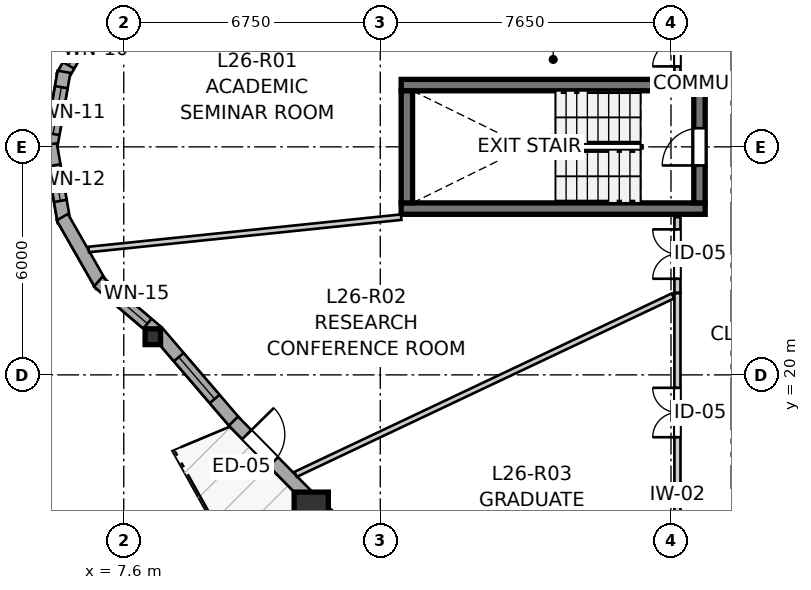
"""IFC4 building model, lengths in metres.
Left out: names, types, materials, properties, quantities, classifications, styles, units other than length and angle.
Written with IfcOpenShell. Run it as: python <this file> out.ifc"""

import sys

from ifc_helpers import new_model, si_unit, direction, frame, frame_2d, origin, origin_2d, place, context, subcontext, project, spatial, rectangle, i_section, extrude, source, transform, mapped, element, fill, save


model = new_model("IFC4")
c1 = context("Model", 3, precision=1e-05, world=origin(), true_north=direction((0.0, 1.0)))
c2 = subcontext(c1, "Body", "Model", "MODEL_VIEW")
j1 = project(units=[si_unit("LENGTHUNIT", "METRE"), si_unit("PLANEANGLEUNIT", "RADIAN")], contexts=[c1])
p1 = place(None, origin())
s1 = spatial("IfcSite", under=j1, at=p1, CompositionType="ELEMENT")
p2 = place(p1, origin())
s2 = spatial("IfcBuilding", under=s1, at=p2, CompositionType="ELEMENT")
p3 = place(p2, frame((0.0, 0.0, 89.6)))
s3 = spatial("IfcBuildingStorey", under=s2, at=p3, CompositionType="ELEMENT", Elevation=89.6)
for number, where, z_axis, x_axis in (
    (1, (14.9, 24.375, 0.0), (0.0, 0.0, 1.0), (1.0, 0.0, 0.0)),
    (2, (22.9, 27.625, 0.0), (0.0, 0.0, 1.0), (-1.0, 0.0, 0.0)),
):
    element("IfcWall", number, at=place(p3, frame(where, z_axis=z_axis, x_axis=x_axis)), inside=s3, PredefinedType="SHEAR", context=c2, shape_type="SweptSolid", body=[
        extrude(rectangle(XDim=8.0, YDim=0.3, at=frame_2d((4.0, 0.0))), origin(), (0.0, 0.0, 1.0), 2.95),
    ])
p4 = place(p3, frame((15.05, 27.475, 0.0), z_axis=(0.0, 0.0, 1.0), x_axis=(0.0, -1.0, 0.0)))
e3 = element("IfcWall", 3, at=p4, inside=s3, PredefinedType="SHEAR", context=c2, shape_type="SweptSolid", body=[
    extrude(rectangle(XDim=2.95, YDim=0.3, at=frame_2d((1.475, 0.0))), origin(), (0.0, 0.0, 1.0), 2.95),
])
p5 = place(p3, frame((22.75, 24.525, 0.0), z_axis=(0.0, 0.0, 1.0), x_axis=(0.0, 1.0, 0.0)))
e4 = element("IfcWall", 4, at=p5, inside=s3, PredefinedType="SHEAR", context=c2, shape_type="SweptSolid", body=[
    extrude(rectangle(XDim=2.95, YDim=0.3, at=frame_2d((1.475, 0.0))), origin(), (0.0, 0.0, 1.0), 2.95),
])
p6 = place(p5, frame((0.985, 0.0, 0.0)))
e5 = element("IfcOpeningElement", 5, at=p6, cuts=e4, PredefinedType="OPENING", context=c2, shape_type="SweptSolid", body=[
    extrude(rectangle(XDim=0.98, YDim=2.15, at=frame_2d((0.49, 1.075))), frame((0.0, 0.16, 0.0), z_axis=(0.0, -1.0, 0.0), x_axis=(1.0, 0.0, 0.0)), (0.0, 0.0, 1.0), 0.32),
])
m1 = source(origin(), c2, "Body", "SweptSolid", [
    extrude(i_section(OverallWidth=0.406, OverallDepth=0.416, WebThickness=0.027, FlangeThickness=0.044, FilletRadius=0.015, at=origin_2d()), origin(), (0.0, 0.0, 1.0), 2.95),
])
p7 = place(p3, frame((8.365, 21.004, 0.0), z_axis=(0.0, 0.0, 1.0), x_axis=(1.0, 0.0, 0.0)))
e6 = element("IfcColumn", 6, at=p7, inside=s3, PredefinedType="PILASTER", context=c2, shape_type="MappedRepresentation", body=[
    mapped(m1, transform((0.0, 0.0, 0.0), x_axis=(1.0, 0.0, 0.0), y_axis=(0.0, 1.0, 0.0), z_axis=(0.0, 0.0, 1.0), scale=1.0)),
])
m2 = source(origin(), c2, "Body", "SweptSolid", [
    extrude(rectangle(XDim=0.9, YDim=0.9, at=origin_2d()), origin(), (0.0, 0.0, 1.0), 2.95),
])
p8 = place(p3, frame((12.534, 16.465, 0.0), z_axis=(0.0, 0.0, 1.0), x_axis=(1.0, 0.0, 0.0)))
e7 = element("IfcColumn", 7, at=p8, inside=s3, PredefinedType="COLUMN", context=c2, shape_type="MappedRepresentation", body=[
    mapped(m2, transform((0.0, 0.0, 0.0), x_axis=(1.0, 0.0, 0.0), y_axis=(0.0, 1.0, 0.0), z_axis=(0.0, 0.0, 1.0), scale=1.0)),
])
p9 = place(p3, frame((7.011, 29.65, 0.0), z_axis=(0.0, 0.0, 1.0), x_axis=(-0.496037473582, -0.868301114132, 0.0)))
e8 = element("IfcWall", 8, at=p9, inside=s3, PredefinedType="SOLIDWALL", context=c2, shape_type="SweptSolid", body=[
    extrude(rectangle(XDim=2.073, YDim=0.34, at=frame_2d((1.037, 0.0))), origin(), (0.0, 0.0, 1.0), 2.48),
])
p10 = place(p9, frame((0.336, 0.0, 0.82)))
e9 = element("IfcOpeningElement", 9, at=p10, cuts=e8, PredefinedType="OPENING", context=c2, shape_type="SweptSolid", body=[
    extrude(rectangle(XDim=1.4, YDim=1.35, at=frame_2d((0.7, 0.675))), frame((0.0, 0.18, 0.0), z_axis=(0.0, -1.0, 0.0), x_axis=(1.0, 0.0, 0.0)), (0.0, 0.0, 1.0), 0.36),
])
p11 = place(p3, frame((6.028, 27.975, 0.0), z_axis=(0.0, 0.0, 1.0), x_axis=(-0.172186061474, -0.985064444711, 0.0)))
e10 = element("IfcWall", 10, at=p11, inside=s3, PredefinedType="SOLIDWALL", context=c2, shape_type="SweptSolid", body=[
    extrude(rectangle(XDim=2.073, YDim=0.34, at=frame_2d((1.037, 0.0))), origin(), (0.0, 0.0, 1.0), 2.48),
])
p12 = place(p11, frame((0.412, 0.0, 0.82)))
e11 = element("IfcOpeningElement", 11, at=p12, cuts=e10, PredefinedType="OPENING", context=c2, shape_type="SweptSolid", body=[
    extrude(rectangle(XDim=1.25, YDim=1.35, at=frame_2d((0.625, 0.675))), frame((0.0, 0.18, 0.0), z_axis=(0.0, -1.0, 0.0), x_axis=(1.0, 0.0, 0.0)), (0.0, 0.0, 1.0), 0.36),
])
p13 = place(p3, frame((5.671, 26.067, 0.0), z_axis=(0.0, 0.0, 1.0), x_axis=(0.172186061474, -0.985064444711, 0.0)))
e12 = element("IfcWall", 12, at=p13, inside=s3, PredefinedType="SOLIDWALL", context=c2, shape_type="SweptSolid", body=[
    extrude(rectangle(XDim=2.073, YDim=0.34, at=frame_2d((1.037, 0.0))), origin(), (0.0, 0.0, 1.0), 2.48),
])
p14 = place(p13, frame((0.562, 0.0, 0.82)))
e13 = element("IfcOpeningElement", 13, at=p14, cuts=e12, PredefinedType="OPENING", context=c2, shape_type="SweptSolid", body=[
    extrude(rectangle(XDim=0.95, YDim=1.35, at=frame_2d((0.475, 0.675))), frame((0.0, 0.18, 0.0), z_axis=(0.0, -1.0, 0.0), x_axis=(1.0, 0.0, 0.0)), (0.0, 0.0, 1.0), 0.36),
])
p15 = place(p3, frame((5.983, 24.15, 0.0), z_axis=(0.0, 0.0, 1.0), x_axis=(0.496037473582, -0.868301114132, 0.0)))
e14 = element("IfcWall", 14, at=p15, inside=s3, PredefinedType="SOLIDWALL", context=c2, shape_type="SweptSolid", body=[
    extrude(rectangle(XDim=2.073, YDim=0.34, at=frame_2d((1.037, 0.0))), origin(), (0.0, 0.0, 1.0), 2.48),
])
p16 = place(p3, frame((6.926, 22.453, 0.0), z_axis=(0.0, 0.0, 1.0), x_axis=(0.76114353683, -0.648583469063, 0.0)))
e15 = element("IfcWall", 15, at=p16, inside=s3, PredefinedType="SOLIDWALL", context=c2, shape_type="SweptSolid", body=[
    extrude(rectangle(XDim=2.015, YDim=0.34, at=frame_2d((1.007, 0.0))), origin(), (0.0, 0.0, 1.0), 2.48),
])
p17 = place(p16, frame((0.252, 0.0, 0.82)))
e16 = element("IfcOpeningElement", 16, at=p17, cuts=e15, PredefinedType="OPENING", context=c2, shape_type="SweptSolid", body=[
    extrude(rectangle(XDim=1.45, YDim=1.25, at=frame_2d((0.725, 0.625))), frame((0.0, 0.18, 0.0), z_axis=(0.0, -1.0, 0.0), x_axis=(1.0, 0.0, 0.0)), (0.0, 0.0, 1.0), 0.36),
])
p18 = place(p3, frame((8.507, 21.099, 0.0), z_axis=(0.0, 0.0, 1.0), x_axis=(0.650714375508, -0.759322593834, 0.0)))
e17 = element("IfcWall", 17, at=p18, inside=s3, PredefinedType="SOLIDWALL", context=c2, shape_type="SweptSolid", body=[
    extrude(rectangle(XDim=3.134, YDim=0.34, at=frame_2d((1.567, 0.0))), origin(), (0.0, 0.0, 1.0), 2.48),
])
p19 = place(p18, frame((0.832, 0.0, 0.82)))
e18 = element("IfcOpeningElement", 18, at=p19, cuts=e17, PredefinedType="OPENING", context=c2, shape_type="SweptSolid", body=[
    extrude(rectangle(XDim=1.45, YDim=1.25, at=frame_2d((0.725, 0.625))), frame((0.0, 0.18, 0.0), z_axis=(0.0, -1.0, 0.0), x_axis=(1.0, 0.0, 0.0)), (0.0, 0.0, 1.0), 0.36),
])
p20 = place(p3, frame((10.487, 18.784, 0.0), z_axis=(0.0, 0.0, 1.0), x_axis=(0.701920439278, -0.71225535935, 0.0)))
e19 = element("IfcWall", 19, at=p20, inside=s3, PredefinedType="SOLIDWALL", context=c2, shape_type="SweptSolid", body=[
    extrude(rectangle(XDim=2.858, YDim=0.34, at=frame_2d((1.429, 0.0))), origin(), (0.0, 0.0, 1.0), 2.48),
])
p21 = place(p20, frame((0.5, 0.0, 0.0)))
e20 = element("IfcOpeningElement", 20, at=p21, cuts=e19, PredefinedType="OPENING", context=c2, shape_type="SweptSolid", body=[
    extrude(rectangle(XDim=1.0, YDim=2.1, at=frame_2d((0.5, 1.05))), frame((0.0, 0.18, 0.0), z_axis=(0.0, -1.0, 0.0), x_axis=(1.0, 0.0, 0.0)), (0.0, 0.0, 1.0), 0.36),
])
p22 = place(p3, frame((12.819, 16.441, 0.0), z_axis=(0.0, 0.0, 1.0), x_axis=(0.751471759174, -0.659765257621, 0.0)))
e21 = element("IfcWall", 21, at=p22, inside=s3, PredefinedType="SOLIDWALL", context=c2, shape_type="SweptSolid", body=[
    extrude(rectangle(XDim=2.809, YDim=0.34, at=frame_2d((1.404, 0.0))), origin(), (0.0, 0.0, 1.0), 2.48),
])
p23 = place(p22, frame((0.499, 0.0, 0.82)))
e22 = element("IfcOpeningElement", 22, at=p23, cuts=e21, PredefinedType="OPENING", context=c2, shape_type="SweptSolid", body=[
    extrude(rectangle(XDim=1.8, YDim=1.45, at=frame_2d((0.9, 0.725))), frame((0.0, 0.18, 0.0), z_axis=(0.0, -1.0, 0.0), x_axis=(1.0, 0.0, 0.0)), (0.0, 0.0, 1.0), 0.36),
])
p24 = place(p3, frame((22.17, 15.862, 0.0), z_axis=(0.0, 0.0, 1.0), x_axis=(0.0, 1.0, 0.0)))
e23 = element("IfcWall", 23, at=p24, inside=s3, PredefinedType="PARTITIONING", context=c2, shape_type="SweptSolid", body=[
    extrude(rectangle(XDim=6.287, YDim=0.16, at=frame_2d((3.144, 0.0))), origin(), (0.0, 0.0, 1.0), 2.95),
])
p25 = place(p24, frame((2.498, 0.0, 0.0)))
e24 = element("IfcOpeningElement", 24, at=p25, cuts=e23, PredefinedType="OPENING", context=c2, shape_type="SweptSolid", body=[
    extrude(rectangle(XDim=1.3, YDim=2.1, at=frame_2d((0.65, 1.05))), frame((0.0, 0.09, 0.0), z_axis=(0.0, -1.0, 0.0), x_axis=(1.0, 0.0, 0.0)), (0.0, 0.0, 1.0), 0.18),
])
p26 = place(p3, frame((22.17, 22.164, 0.0), z_axis=(0.0, 0.0, 1.0), x_axis=(0.0, 1.0, 0.0)))
e25 = element("IfcWall", 25, at=p26, inside=s3, PredefinedType="PARTITIONING", context=c2, shape_type="SweptSolid", body=[
    extrude(rectangle(XDim=1.986, YDim=0.16, at=frame_2d((0.993, 0.0))), origin(), (0.0, 0.0, 1.0), 2.95),
])
p27 = place(p26, frame((0.365, 0.0, 0.0)))
e26 = element("IfcOpeningElement", 26, at=p27, cuts=e25, PredefinedType="OPENING", context=c2, shape_type="SweptSolid", body=[
    extrude(rectangle(XDim=1.3, YDim=2.1, at=frame_2d((0.65, 1.05))), frame((0.0, 0.09, 0.0), z_axis=(0.0, -1.0, 0.0), x_axis=(1.0, 0.0, 0.0)), (0.0, 0.0, 1.0), 0.18),
])
p28 = place(p3, frame((22.17, 27.85, 0.0), z_axis=(0.0, 0.0, 1.0), x_axis=(0.0, 1.0, 0.0)))
e27 = element("IfcWall", 27, at=p28, inside=s3, PredefinedType="PARTITIONING", context=c2, shape_type="SweptSolid", body=[
    extrude(rectangle(XDim=1.785, YDim=0.16, at=frame_2d((0.893, 0.0))), origin(), (0.0, 0.0, 1.0), 2.95),
])
p29 = place(p28, frame((0.267, 0.0, 0.0)))
e28 = element("IfcOpeningElement", 28, at=p29, cuts=e27, PredefinedType="OPENING", context=c2, shape_type="SweptSolid", body=[
    extrude(rectangle(XDim=1.3, YDim=2.1, at=frame_2d((0.65, 1.05))), frame((0.0, 0.09, 0.0), z_axis=(0.0, -1.0, 0.0), x_axis=(1.0, 0.0, 0.0)), (0.0, 0.0, 1.0), 0.18),
])
p30 = place(p3, frame((12.123, 17.383, 0.0), z_axis=(0.0, 0.0, 1.0), x_axis=(0.904049465168, 0.427427847162, 0.0)))
e29 = element("IfcWall", 29, at=p30, inside=s3, PredefinedType="PARTITIONING", context=c2, shape_type="SweptSolid", body=[
    extrude(rectangle(XDim=10.983, YDim=0.145, at=frame_2d((5.491, 0.0))), origin(), (0.0, 0.0, 1.0), 2.95),
])
p31 = place(p3, frame((6.678, 23.299, 0.0), z_axis=(0.0, 0.0, 1.0), x_axis=(0.994682199009, 0.102991858774, 0.0)))
e30 = element("IfcWall", 30, at=p31, inside=s3, PredefinedType="PARTITIONING", context=c2, shape_type="SweptSolid", body=[
    extrude(rectangle(XDim=8.266, YDim=0.145, at=frame_2d((4.133, 0.0))), origin(), (0.0, 0.0, 1.0), 2.95),
])
m3 = source(origin(), c2, "Body", "SweptSolid", [
    extrude(rectangle(XDim=1.4, YDim=1.35, at=frame_2d((0.7, 0.675))), frame((0.0, 0.03, 0.0), z_axis=(0.0, -1.0, 0.0), x_axis=(1.0, 0.0, 0.0)), (0.0, 0.0, 1.0), 0.06),
])
p32 = place(p10, origin())
e31 = element("IfcWindow", 31, at=p32, inside=s3, PartitioningType="SINGLE_PANEL", PredefinedType="WINDOW", context=c2, shape_type="MappedRepresentation", body=[
    mapped(m3, transform((0.0, 0.0, 0.0), x_axis=(1.0, 0.0, 0.0), y_axis=(0.0, 1.0, 0.0), z_axis=(0.0, 0.0, 1.0), scale=1.0)),
])
fill(e9, e31)
m4 = source(origin(), c2, "Body", "SweptSolid", [
    extrude(rectangle(XDim=1.25, YDim=1.35, at=frame_2d((0.625, 0.675))), frame((0.0, 0.03, 0.0), z_axis=(0.0, -1.0, 0.0), x_axis=(1.0, 0.0, 0.0)), (0.0, 0.0, 1.0), 0.06),
])
p33 = place(p12, origin())
e32 = element("IfcWindow", 32, at=p33, inside=s3, PartitioningType="SINGLE_PANEL", PredefinedType="WINDOW", context=c2, shape_type="MappedRepresentation", body=[
    mapped(m4, transform((0.0, 0.0, 0.0), x_axis=(1.0, 0.0, 0.0), y_axis=(0.0, 1.0, 0.0), z_axis=(0.0, 0.0, 1.0), scale=1.0)),
])
fill(e11, e32)
m5 = source(origin(), c2, "Body", "SweptSolid", [
    extrude(rectangle(XDim=0.95, YDim=1.35, at=frame_2d((0.475, 0.675))), frame((0.0, 0.03, 0.0), z_axis=(0.0, -1.0, 0.0), x_axis=(1.0, 0.0, 0.0)), (0.0, 0.0, 1.0), 0.06),
])
p34 = place(p14, origin())
e33 = element("IfcWindow", 33, at=p34, inside=s3, PartitioningType="SINGLE_PANEL", PredefinedType="WINDOW", context=c2, shape_type="MappedRepresentation", body=[
    mapped(m5, transform((0.0, 0.0, 0.0), x_axis=(1.0, 0.0, 0.0), y_axis=(0.0, 1.0, 0.0), z_axis=(0.0, 0.0, 1.0), scale=1.0)),
])
fill(e13, e33)
m6 = source(origin(), c2, "Body", "SweptSolid", [
    extrude(rectangle(XDim=1.45, YDim=1.25, at=frame_2d((0.725, 0.625))), frame((0.0, 0.03, 0.0), z_axis=(0.0, -1.0, 0.0), x_axis=(1.0, 0.0, 0.0)), (0.0, 0.0, 1.0), 0.06),
])
p35 = place(p17, origin())
e34 = element("IfcWindow", 34, at=p35, inside=s3, PartitioningType="SINGLE_PANEL", PredefinedType="WINDOW", context=c2, shape_type="MappedRepresentation", body=[
    mapped(m6, transform((0.0, 0.0, 0.0), x_axis=(1.0, 0.0, 0.0), y_axis=(0.0, 1.0, 0.0), z_axis=(0.0, 0.0, 1.0), scale=1.0)),
])
fill(e16, e34)
p36 = place(p19, origin())
e35 = element("IfcWindow", 35, at=p36, inside=s3, PartitioningType="SINGLE_PANEL", PredefinedType="WINDOW", context=c2, shape_type="MappedRepresentation", body=[
    mapped(m6, transform((0.0, 0.0, 0.0), x_axis=(1.0, 0.0, 0.0), y_axis=(0.0, 1.0, 0.0), z_axis=(0.0, 0.0, 1.0), scale=1.0)),
])
fill(e18, e35)
m7 = source(origin(), c2, "Body", "SweptSolid", [
    extrude(rectangle(XDim=1.0, YDim=2.1, at=frame_2d((0.5, 1.05))), frame((0.0, 0.025, 0.0), z_axis=(0.0, -1.0, 0.0), x_axis=(1.0, 0.0, 0.0)), (0.0, 0.0, 1.0), 0.05),
])
p37 = place(p21, origin())
e36 = element("IfcDoor", 36, at=p37, inside=s3, OperationType="SINGLE_SWING_LEFT", PredefinedType="DOOR", context=c2, shape_type="MappedRepresentation", body=[
    mapped(m7, transform((0.0, 0.0, 0.0), x_axis=(1.0, 0.0, 0.0), y_axis=(0.0, 1.0, 0.0), z_axis=(0.0, 0.0, 1.0), scale=1.0)),
])
fill(e20, e36)
m8 = source(origin(), c2, "Body", "SweptSolid", [
    extrude(rectangle(XDim=0.98, YDim=2.15, at=frame_2d((0.49, 1.075))), frame((0.0, 0.025, 0.0), z_axis=(0.0, -1.0, 0.0), x_axis=(1.0, 0.0, 0.0)), (0.0, 0.0, 1.0), 0.05),
])
p38 = place(p6, origin())
e37 = element("IfcDoor", 37, at=p38, inside=s3, OperationType="SINGLE_SWING_LEFT", PredefinedType="DOOR", context=c2, shape_type="MappedRepresentation", body=[
    mapped(m8, transform((0.0, 0.0, 0.0), x_axis=(1.0, 0.0, 0.0), y_axis=(0.0, 1.0, 0.0), z_axis=(0.0, 0.0, 1.0), scale=1.0)),
])
fill(e5, e37)
m9 = source(origin(), c2, "Body", "SweptSolid", [
    extrude(rectangle(XDim=1.3, YDim=2.1, at=frame_2d((0.65, 1.05))), frame((0.0, 0.025, 0.0), z_axis=(0.0, -1.0, 0.0), x_axis=(1.0, 0.0, 0.0)), (0.0, 0.0, 1.0), 0.05),
])
p39 = place(p25, origin())
e38 = element("IfcDoor", 38, at=p39, inside=s3, OperationType="DOUBLE_DOOR_SINGLE_SWING", PredefinedType="DOOR", context=c2, shape_type="MappedRepresentation", body=[
    mapped(m9, transform((0.0, 0.0, 0.0), x_axis=(1.0, 0.0, 0.0), y_axis=(0.0, 1.0, 0.0), z_axis=(0.0, 0.0, 1.0), scale=1.0)),
])
fill(e24, e38)
p40 = place(p27, origin())
e39 = element("IfcDoor", 39, at=p40, inside=s3, OperationType="DOUBLE_DOOR_SINGLE_SWING", PredefinedType="DOOR", context=c2, shape_type="MappedRepresentation", body=[
    mapped(m9, transform((0.0, 0.0, 0.0), x_axis=(1.0, 0.0, 0.0), y_axis=(0.0, 1.0, 0.0), z_axis=(0.0, 0.0, 1.0), scale=1.0)),
])
fill(e26, e39)
p41 = place(p29, origin())
e40 = element("IfcDoor", 40, at=p41, inside=s3, OperationType="DOUBLE_DOOR_SINGLE_SWING", PredefinedType="DOOR", context=c2, shape_type="MappedRepresentation", body=[
    mapped(m9, transform((0.0, 0.0, 0.0), x_axis=(1.0, 0.0, 0.0), y_axis=(0.0, 1.0, 0.0), z_axis=(0.0, 0.0, 1.0), scale=1.0)),
])
fill(e28, e40)
save(model, sys.argv[1])
